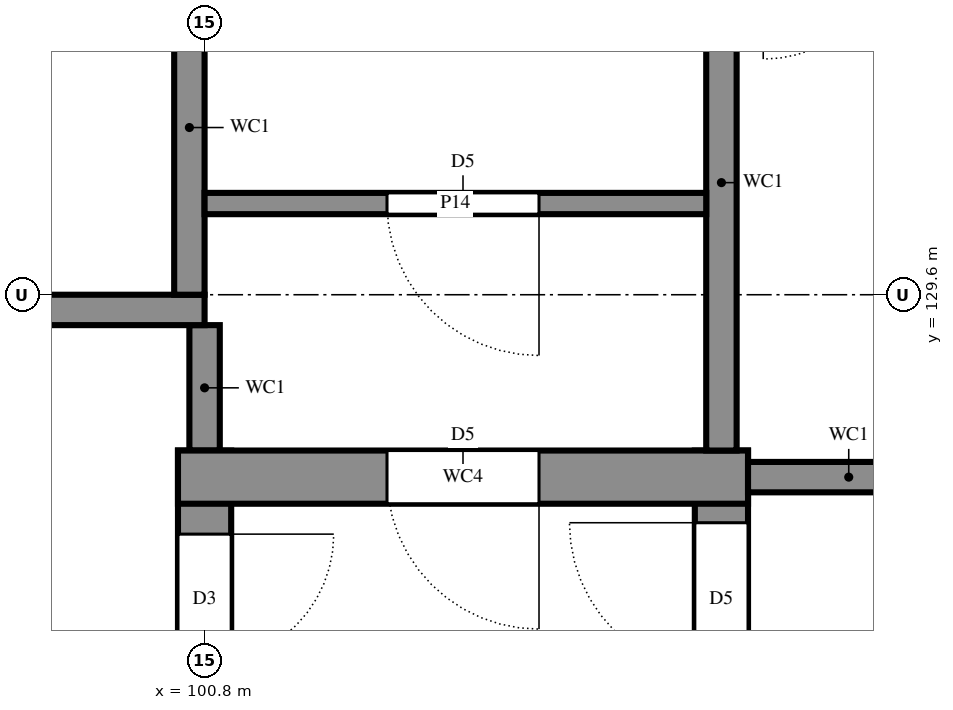
"""IFC4 building model, lengths in metres.
Left out: names, types, materials, properties, quantities, classifications, styles, units other than length and angle.
Written with IfcOpenShell. Run it as: python <this file> out.ifc"""

import sys

from ifc_helpers import new_model, si_unit, direction, frame, frame_2d, origin, place, context, subcontext, project, spatial, rectangle, extrude, element, fill, save


model = new_model("IFC4")
c1 = context("Model", 3, precision=1e-05, world=origin(), true_north=direction((0.0, 1.0)))
c2 = subcontext(c1, "Body", "Model", "MODEL_VIEW")
j1 = project(units=[si_unit("LENGTHUNIT", "METRE"), si_unit("PLANEANGLEUNIT", "RADIAN")], contexts=[c1])
p1 = place(None, origin())
s1 = spatial("IfcSite", under=j1, at=p1, CompositionType="ELEMENT")
p2 = place(p1, origin())
s2 = spatial("IfcBuilding", under=s1, at=p2, CompositionType="ELEMENT")
p3 = place(p2, frame((0.0, 0.0, 3.6)))
s3 = spatial("IfcBuildingStorey", under=s2, at=p3, CompositionType="ELEMENT", Elevation=3.6)
p4 = place(p3, frame((104.2, 125.1, 0.0), z_axis=(0.0, 0.0, 1.0), x_axis=(0.0, 1.0, 0.0)))
e1 = element("IfcWall", 1, at=p4, inside=s3, PredefinedType="SHEAR", context=c2, shape_type="SweptSolid", body=[
    extrude(rectangle(XDim=3.475, YDim=0.35, at=frame_2d((1.737, 0.0))), origin(), (0.0, 0.0, 1.0), 3.6),
])
p5 = place(p4, frame((2.0, 0.0, 0.0)))
e2 = element("IfcOpeningElement", 2, at=p5, cuts=e1, PredefinedType="OPENING", context=c2, shape_type="SweptSolid", body=[
    extrude(rectangle(XDim=1.0, YDim=2.1, at=frame_2d((0.5, 1.05))), frame((0.0, 0.185, 0.0), z_axis=(0.0, -1.0, 0.0), x_axis=(1.0, 0.0, 0.0)), (0.0, 0.0, 1.0), 0.37),
])
p6 = place(p3, frame((100.8, 128.575, 0.0), z_axis=(0.0, 0.0, 1.0), x_axis=(0.0, -1.0, 0.0)))
e3 = element("IfcWall", 3, at=p6, inside=s3, PredefinedType="SHEAR", context=c2, shape_type="SweptSolid", body=[
    extrude(rectangle(XDim=6.35, YDim=0.35, at=frame_2d((3.175, 0.0))), origin(), (0.0, 0.0, 1.0), 3.6),
])
p7 = place(p6, frame((0.55, 0.0, 0.0)))
e4 = element("IfcOpeningElement", 4, at=p7, cuts=e3, PredefinedType="OPENING", context=c2, shape_type="SweptSolid", body=[
    extrude(rectangle(XDim=0.85, YDim=2.1, at=frame_2d((0.425, 1.05))), frame((0.0, 0.185, 0.0), z_axis=(0.0, -1.0, 0.0), x_axis=(1.0, 0.0, 0.0)), (0.0, 0.0, 1.0), 0.37),
])
p8 = place(p3, frame((100.8, 128.575, 0.0), z_axis=(0.0, 0.0, 1.0), x_axis=(0.0, 1.0, 0.0)))
e5 = element("IfcWall", 5, at=p8, inside=s3, PredefinedType="SHEAR", context=c2, shape_type="SweptSolid", body=[
    extrude(rectangle(XDim=0.825, YDim=0.2, at=frame_2d((0.413, 0.0))), origin(), (0.0, 0.0, 1.0), 3.6),
])
p9 = place(p3, frame((104.375, 128.4, 0.0), z_axis=(0.0, 0.0, 1.0), x_axis=(-1.0, 0.0, 0.0)))
e6 = element("IfcWall", 6, at=p9, inside=s3, PredefinedType="SHEAR", context=c2, shape_type="SweptSolid", body=[
    extrude(rectangle(XDim=3.75, YDim=0.35, at=frame_2d((1.875, 0.0))), origin(), (0.0, 0.0, 1.0), 3.6),
])
p10 = place(p9, frame((1.375, 0.0, 0.0)))
e7 = element("IfcOpeningElement", 7, at=p10, cuts=e6, PredefinedType="OPENING", context=c2, shape_type="SweptSolid", body=[
    extrude(rectangle(XDim=1.0, YDim=2.1, at=frame_2d((0.5, 1.05))), frame((0.0, 0.185, 0.0), z_axis=(0.0, -1.0, 0.0), x_axis=(1.0, 0.0, 0.0)), (0.0, 0.0, 1.0), 0.37),
])
p11 = place(p3, frame((104.375, 128.4, 0.0), z_axis=(0.0, 0.0, 1.0), x_axis=(1.0, 0.0, 0.0)))
e8 = element("IfcWall", 8, at=p11, inside=s3, PredefinedType="SHEAR", context=c2, shape_type="SweptSolid", body=[
    extrude(rectangle(XDim=1.325, YDim=0.2, at=frame_2d((0.663, 0.0))), origin(), (0.0, 0.0, 1.0), 3.6),
])
p12 = place(p3, frame((104.2, 132.1, 0.0), z_axis=(0.0, 0.0, 1.0), x_axis=(0.0, -1.0, 0.0)))
e9 = element("IfcWall", 9, at=p12, inside=s3, PredefinedType="SHEAR", context=c2, shape_type="SweptSolid", body=[
    extrude(rectangle(XDim=3.525, YDim=0.2, at=frame_2d((1.763, 0.0))), origin(), (0.0, 0.0, 1.0), 3.6),
])
p13 = place(p3, frame((98.4, 129.5, 0.0), z_axis=(0.0, 0.0, 1.0), x_axis=(1.0, 0.0, 0.0)))
e10 = element("IfcWall", 10, at=p13, inside=s3, PredefinedType="SHEAR", context=c2, shape_type="SweptSolid", body=[
    extrude(rectangle(XDim=2.4, YDim=0.2, at=frame_2d((1.2, 0.0))), origin(), (0.0, 0.0, 1.0), 3.6),
])
p14 = place(p3, frame((100.7, 129.6, 0.0), z_axis=(0.0, 0.0, 1.0), x_axis=(0.0, 1.0, 0.0)))
e11 = element("IfcWall", 11, at=p14, inside=s3, PredefinedType="SHEAR", context=c2, shape_type="SweptSolid", body=[
    extrude(rectangle(XDim=2.2, YDim=0.2, at=frame_2d((1.1, 0.0))), origin(), (0.0, 0.0, 1.0), 3.6),
])
p15 = place(p3, frame((100.8, 130.2, 0.0), z_axis=(0.0, 0.0, 1.0), x_axis=(1.0, 0.0, 0.0)))
e12 = element("IfcWall", 12, at=p15, inside=s3, PredefinedType="PARTITIONING", context=c2, shape_type="SweptSolid", body=[
    extrude(rectangle(XDim=3.3, YDim=0.14, at=frame_2d((1.65, 0.0))), origin(), (0.0, 0.0, 1.0), 3.42),
])
p16 = place(p15, frame((1.2, 0.0, 0.0)))
e13 = element("IfcOpeningElement", 13, at=p16, cuts=e12, PredefinedType="OPENING", context=c2, shape_type="SweptSolid", body=[
    extrude(rectangle(XDim=1.0, YDim=2.1, at=frame_2d((0.5, 1.05))), frame((0.0, 0.08, 0.0), z_axis=(0.0, -1.0, 0.0), x_axis=(1.0, 0.0, 0.0)), (0.0, 0.0, 1.0), 0.16),
])
p17 = place(p16, frame((1.0, 0.0, 0.0), z_axis=(0.0, 0.0, 1.0), x_axis=(-1.0, 0.0, 0.0)))
e14 = element("IfcDoor", 14, at=p17, inside=s3, OperationType="SINGLE_SWING_RIGHT", PredefinedType="DOOR", context=c2, shape_type="SweptSolid", body=[
    extrude(rectangle(XDim=1.0, YDim=2.1, at=frame_2d((0.5, 1.05))), frame((0.0, 0.025, 0.0), z_axis=(0.0, -1.0, 0.0), x_axis=(1.0, 0.0, 0.0)), (0.0, 0.0, 1.0), 0.05),
])
fill(e13, e14)
p18 = place(p10, origin())
e15 = element("IfcDoor", 15, at=p18, inside=s3, OperationType="SINGLE_SWING_RIGHT", PredefinedType="DOOR", context=c2, shape_type="SweptSolid", body=[
    extrude(rectangle(XDim=1.0, YDim=2.1, at=frame_2d((0.5, 1.05))), frame((0.0, 0.025, 0.0), z_axis=(0.0, -1.0, 0.0), x_axis=(1.0, 0.0, 0.0)), (0.0, 0.0, 1.0), 0.05),
])
fill(e7, e15)
p19 = place(p7, origin())
e16 = element("IfcDoor", 16, at=p19, inside=s3, OperationType="SINGLE_SWING_RIGHT", PredefinedType="DOOR", context=c2, shape_type="SweptSolid", body=[
    extrude(rectangle(XDim=0.85, YDim=2.1, at=frame_2d((0.425, 1.05))), frame((0.0, 0.025, 0.0), z_axis=(0.0, -1.0, 0.0), x_axis=(1.0, 0.0, 0.0)), (0.0, 0.0, 1.0), 0.05),
])
fill(e4, e16)
p20 = place(p5, origin())
e17 = element("IfcDoor", 17, at=p20, inside=s3, OperationType="SINGLE_SWING_LEFT", PredefinedType="DOOR", context=c2, shape_type="SweptSolid", body=[
    extrude(rectangle(XDim=1.0, YDim=2.1, at=frame_2d((0.5, 1.05))), frame((0.0, 0.025, 0.0), z_axis=(0.0, -1.0, 0.0), x_axis=(1.0, 0.0, 0.0)), (0.0, 0.0, 1.0), 0.05),
])
fill(e2, e17)
save(model, sys.argv[1])
